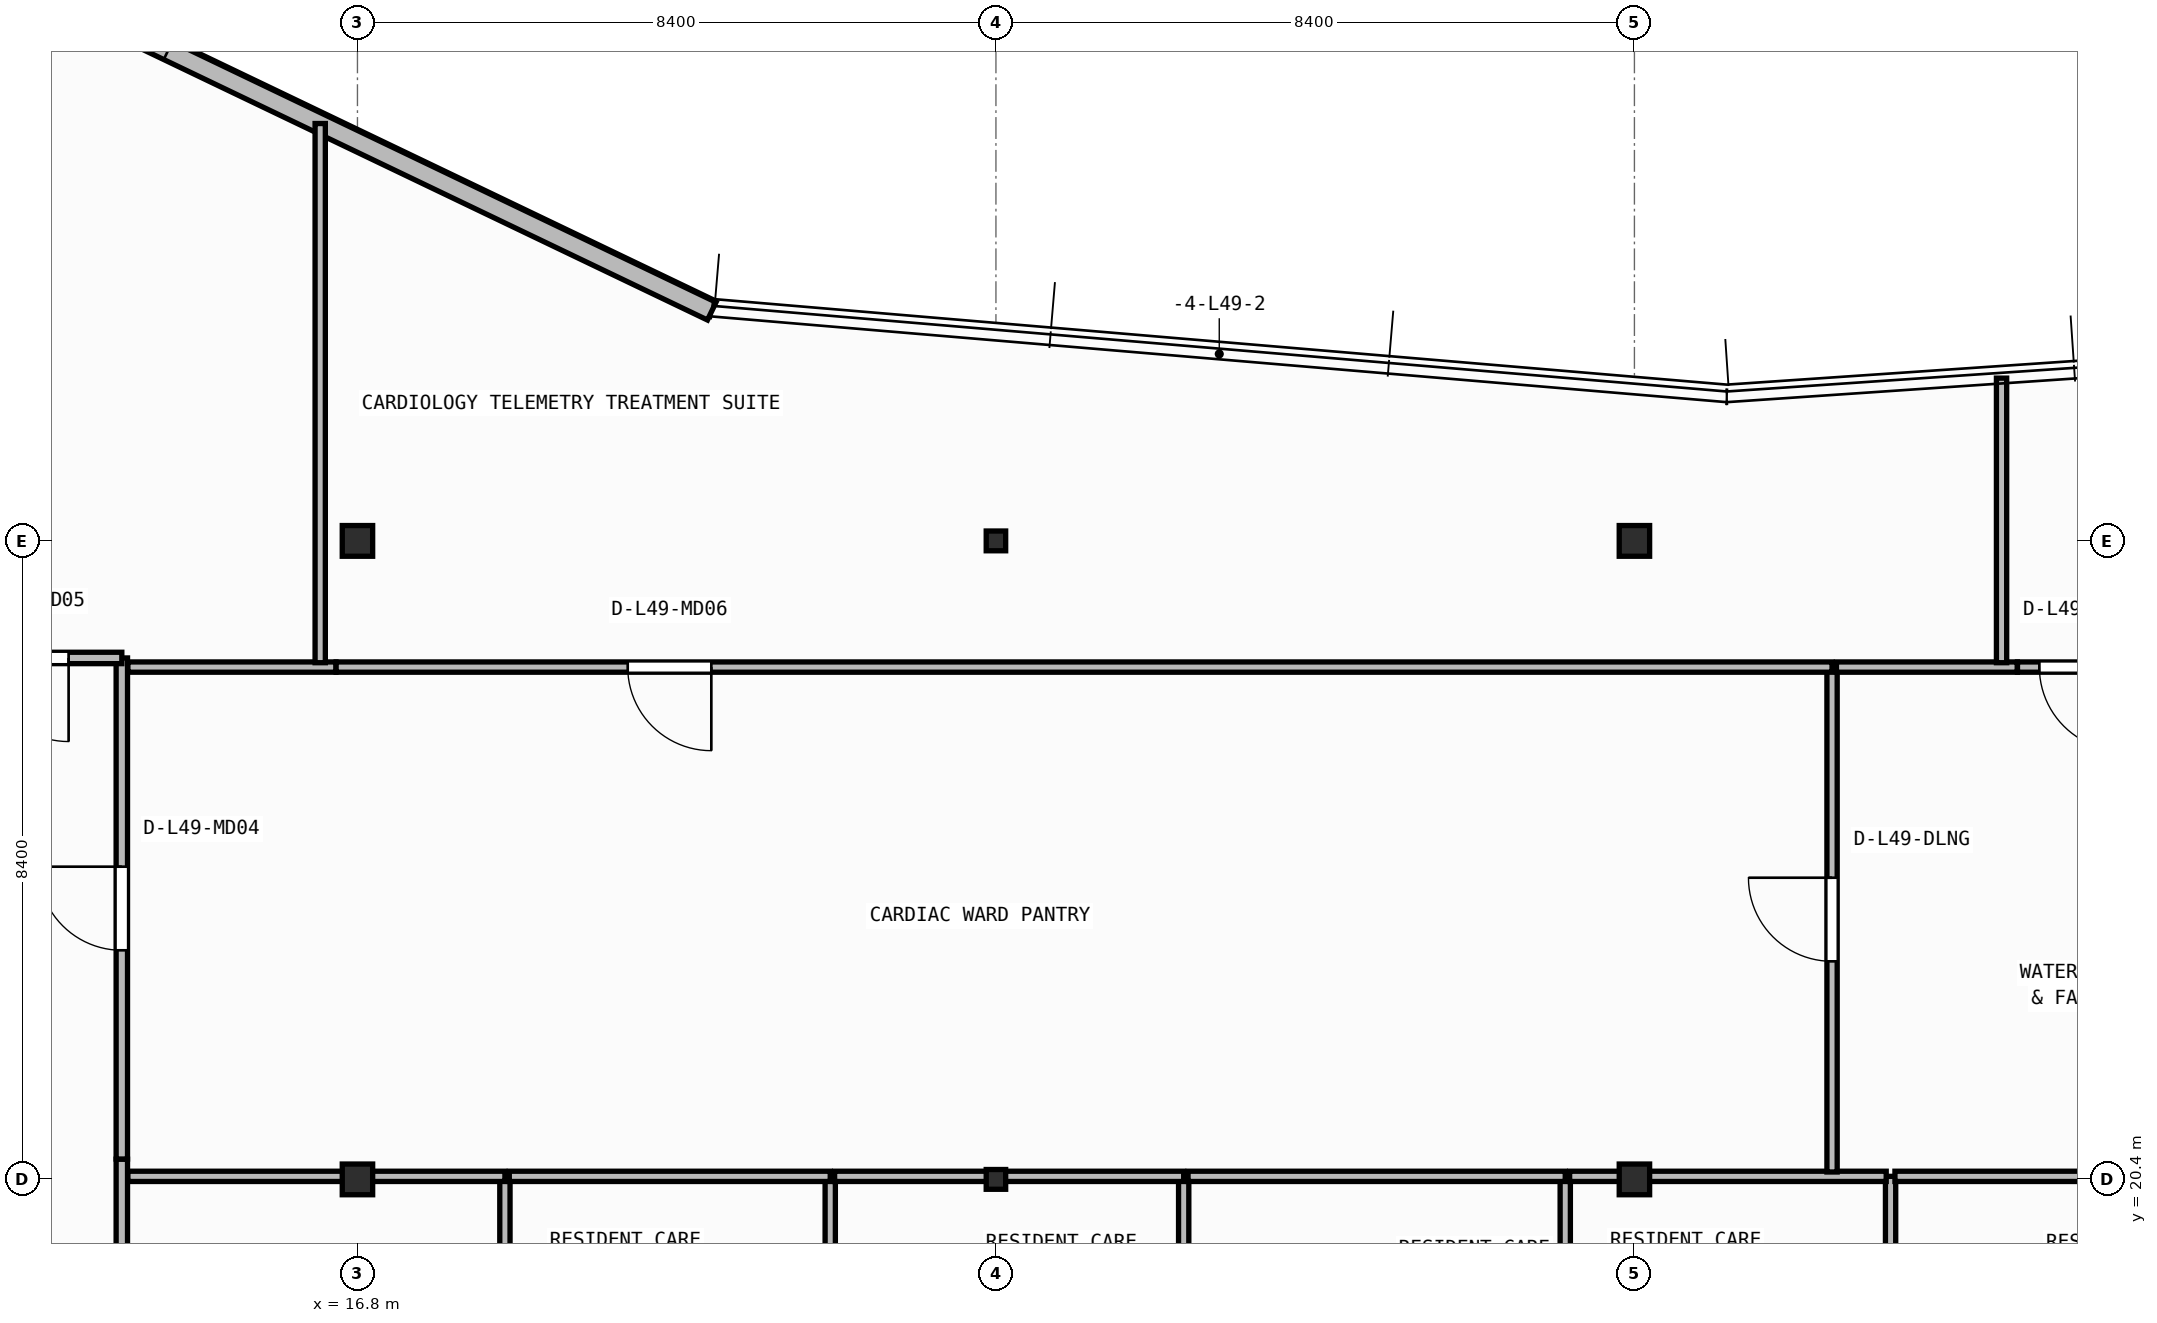
"""IFC4 building model, lengths in metres.
Left out: names, types, materials, properties, quantities, classifications, styles, units other than length and angle.
Written with IfcOpenShell. Run it as: python <this file> out.ifc"""

import sys

from ifc_helpers import new_model, si_unit, direction, frame, frame_2d, origin, origin_2d, place, context, subcontext, project, spatial, rectangle, i_section, extrude, element, fill, save


model = new_model("IFC4")
c1 = context("Model", 3, precision=1e-05, world=origin(), true_north=direction((0.0, 1.0)))
c2 = subcontext(c1, "Body", "Model", "MODEL_VIEW")
j1 = project(units=[si_unit("LENGTHUNIT", "METRE"), si_unit("PLANEANGLEUNIT", "RADIAN")], contexts=[c1])
p1 = place(None, origin())
s1 = spatial("IfcSite", under=j1, at=p1, CompositionType="ELEMENT")
p2 = place(p1, origin())
s2 = spatial("IfcBuilding", under=s1, at=p2, CompositionType="ELEMENT")
p3 = place(p2, frame((0.0, 0.0, 200.0)))
s3 = spatial("IfcBuildingStorey", under=s2, at=p3, CompositionType="ELEMENT", Elevation=200.0)
p4 = place(p3, frame((16.8, 20.4, 0.0), z_axis=(0.0, 0.0, 1.0), x_axis=(1.0, 0.0, 0.0)))
e1 = element("IfcColumn", 1, at=p4, inside=s3, PredefinedType="COLUMN", context=c2, shape_type="SweptSolid", body=[
    extrude(i_section(OverallWidth=0.4, OverallDepth=0.404, WebThickness=0.02, FlangeThickness=0.032, at=origin_2d()), origin(), (0.0, 0.0, 1.0), 3.95),
])
p5 = place(p3, frame((25.2, 20.4, 0.0), z_axis=(0.0, 0.0, 1.0), x_axis=(1.0, 0.0, 0.0)))
e2 = element("IfcColumn", 2, at=p5, inside=s3, PredefinedType="COLUMN", context=c2, shape_type="SweptSolid", body=[
    extrude(i_section(OverallWidth=0.256, OverallDepth=0.26, WebThickness=0.01, FlangeThickness=0.017, FilletRadius=0.013, at=origin_2d()), origin(), (0.0, 0.0, 1.0), 3.95),
])
for number, where, z_axis, x_axis in (
    (3, (33.6, 20.4, 0.0), (0.0, 0.0, 1.0), (1.0, 0.0, 0.0)),
    (4, (16.8, 28.8, 0.0), (0.0, 0.0, 1.0), (1.0, 0.0, 0.0)),
):
    element("IfcColumn", number, at=place(p3, frame(where, z_axis=z_axis, x_axis=x_axis)), inside=s3, PredefinedType="COLUMN", context=c2, shape_type="SweptSolid", body=[
        extrude(i_section(OverallWidth=0.4, OverallDepth=0.404, WebThickness=0.02, FlangeThickness=0.032, at=origin_2d()), origin(), (0.0, 0.0, 1.0), 3.95),
    ])
p6 = place(p3, frame((25.2, 28.8, 0.0), z_axis=(0.0, 0.0, 1.0), x_axis=(1.0, 0.0, 0.0)))
e5 = element("IfcColumn", 5, at=p6, inside=s3, PredefinedType="COLUMN", context=c2, shape_type="SweptSolid", body=[
    extrude(i_section(OverallWidth=0.256, OverallDepth=0.26, WebThickness=0.01, FlangeThickness=0.017, FilletRadius=0.013, at=origin_2d()), origin(), (0.0, 0.0, 1.0), 3.95),
])
p7 = place(p3, frame((33.6, 28.8, 0.0), z_axis=(0.0, 0.0, 1.0), x_axis=(1.0, 0.0, 0.0)))
e6 = element("IfcColumn", 6, at=p7, inside=s3, PredefinedType="COLUMN", context=c2, shape_type="SweptSolid", body=[
    extrude(i_section(OverallWidth=0.4, OverallDepth=0.404, WebThickness=0.02, FlangeThickness=0.032, at=origin_2d()), origin(), (0.0, 0.0, 1.0), 3.95),
])
p8 = place(p3, frame((21.461, 31.823, 0.0), z_axis=(0.0, 0.0, 1.0), x_axis=(-0.901858094827, 0.432032379336, 0.0)))
e7 = element("IfcWall", 7, at=p8, inside=s3, PredefinedType="STANDARD", context=c2, shape_type="SweptSolid", body=[
    extrude(rectangle(XDim=12.532, YDim=0.26, at=frame_2d((6.266, 0.0))), origin(), (0.0, 0.0, 1.0), 3.71),
])
p9 = place(p8, frame((7.932, 0.0, 0.9)))
e8 = element("IfcOpeningElement", 8, at=p9, cuts=e7, PredefinedType="OPENING", context=c2, shape_type="SweptSolid", body=[
    extrude(rectangle(XDim=2.4, YDim=1.65, at=frame_2d((1.2, 0.825))), frame((0.0, 0.14, 0.0), z_axis=(0.0, -1.0, 0.0), x_axis=(1.0, 0.0, 0.0)), (0.0, 0.0, 1.0), 0.28),
])
p10 = place(p3, frame((13.7, 17.814, 0.0), z_axis=(0.0, 0.0, 1.0), x_axis=(0.0, 1.0, 0.0)))
e9 = element("IfcWall", 9, at=p10, inside=s3, PredefinedType="PARTITIONING", context=c2, shape_type="SweptSolid", body=[
    extrude(rectangle(XDim=2.852, YDim=0.15, at=frame_2d((1.426, 0.0))), origin(), (0.0, 0.0, 1.0), 3.71),
])
p11 = place(p3, frame((13.7, 20.668, 0.0), z_axis=(0.0, 0.0, 1.0), x_axis=(0.0, 1.0, 0.0)))
e10 = element("IfcWall", 10, at=p11, inside=s3, PredefinedType="PARTITIONING", context=c2, shape_type="SweptSolid", body=[
    extrude(rectangle(XDim=6.592, YDim=0.15, at=frame_2d((3.296, 0.0))), origin(), (0.0, 0.0, 1.0), 3.71),
])
p12 = place(p11, frame((2.746, 0.0, 0.0)))
e11 = element("IfcOpeningElement", 11, at=p12, cuts=e10, PredefinedType="OPENING", context=c2, shape_type="SweptSolid", body=[
    extrude(rectangle(XDim=1.1, YDim=2.1, at=frame_2d((0.55, 1.05))), frame((0.0, 0.085, 0.0), z_axis=(0.0, -1.0, 0.0), x_axis=(1.0, 0.0, 0.0)), (0.0, 0.0, 1.0), 0.17),
])
p13 = place(p3, frame((13.7, 27.26, 0.0), z_axis=(0.0, 0.0, 1.0), x_axis=(-1.0, 0.0, 0.0)))
e12 = element("IfcWall", 12, at=p13, inside=s3, PredefinedType="PARTITIONING", context=c2, shape_type="SweptSolid", body=[
    extrude(rectangle(XDim=2.5, YDim=0.15, at=frame_2d((1.25, 0.0))), origin(), (0.0, 0.0, 1.0), 3.71),
])
p14 = place(p13, frame((0.7, 0.0, 0.0)))
e13 = element("IfcOpeningElement", 13, at=p14, cuts=e12, PredefinedType="OPENING", context=c2, shape_type="SweptSolid", body=[
    extrude(rectangle(XDim=1.1, YDim=2.1, at=frame_2d((0.55, 1.05))), frame((0.0, 0.085, 0.0), z_axis=(0.0, -1.0, 0.0), x_axis=(1.0, 0.0, 0.0)), (0.0, 0.0, 1.0), 0.17),
])
p15 = place(p3, frame((18.74, 17.833, 0.0), z_axis=(0.0, 0.0, 1.0), x_axis=(0.0, 1.0, 0.0)))
e14 = element("IfcWall", 14, at=p15, inside=s3, PredefinedType="PARTITIONING", context=c2, shape_type="SweptSolid", body=[
    extrude(rectangle(XDim=2.607, YDim=0.135, at=frame_2d((1.304, 0.0))), origin(), (0.0, 0.0, 1.0), 3.71),
])
p16 = place(p3, frame((18.74, 20.44, 0.0), z_axis=(0.0, 0.0, 1.0), x_axis=(-1.0, 0.0, 0.0)))
e15 = element("IfcWall", 15, at=p16, inside=s3, PredefinedType="PARTITIONING", context=c2, shape_type="SweptSolid", body=[
    extrude(rectangle(XDim=4.96, YDim=0.135, at=frame_2d((2.48, 0.0))), origin(), (0.0, 0.0, 1.0), 3.152),
])
p17 = place(p3, frame((23.02, 17.833, 0.0), z_axis=(0.0, 0.0, 1.0), x_axis=(0.0, 1.0, 0.0)))
e16 = element("IfcWall", 16, at=p17, inside=s3, PredefinedType="PARTITIONING", context=c2, shape_type="SweptSolid", body=[
    extrude(rectangle(XDim=2.607, YDim=0.135, at=frame_2d((1.304, 0.0))), origin(), (0.0, 0.0, 1.0), 3.71),
])
p18 = place(p3, frame((23.02, 20.44, 0.0), z_axis=(0.0, 0.0, 1.0), x_axis=(-1.0, 0.0, 0.0)))
e17 = element("IfcWall", 17, at=p18, inside=s3, PredefinedType="PARTITIONING", context=c2, shape_type="SweptSolid", body=[
    extrude(rectangle(XDim=4.222, YDim=0.135, at=frame_2d((2.111, 0.0))), origin(), (0.0, 0.0, 1.0), 3.152),
])
p19 = place(p3, frame((27.67, 17.833, 0.0), z_axis=(0.0, 0.0, 1.0), x_axis=(0.0, 1.0, 0.0)))
e18 = element("IfcWall", 18, at=p19, inside=s3, PredefinedType="PARTITIONING", context=c2, shape_type="SweptSolid", body=[
    extrude(rectangle(XDim=2.607, YDim=0.135, at=frame_2d((1.304, 0.0))), origin(), (0.0, 0.0, 1.0), 3.71),
])
p20 = place(p3, frame((27.67, 20.44, 0.0), z_axis=(0.0, 0.0, 1.0), x_axis=(-1.0, 0.0, 0.0)))
e19 = element("IfcWall", 19, at=p20, inside=s3, PredefinedType="PARTITIONING", context=c2, shape_type="SweptSolid", body=[
    extrude(rectangle(XDim=4.593, YDim=0.135, at=frame_2d((2.296, 0.0))), origin(), (0.0, 0.0, 1.0), 3.152),
])
p21 = place(p3, frame((32.69, 17.833, 0.0), z_axis=(0.0, 0.0, 1.0), x_axis=(0.0, 1.0, 0.0)))
e20 = element("IfcWall", 20, at=p21, inside=s3, PredefinedType="PARTITIONING", context=c2, shape_type="SweptSolid", body=[
    extrude(rectangle(XDim=2.607, YDim=0.135, at=frame_2d((1.304, 0.0))), origin(), (0.0, 0.0, 1.0), 3.71),
])
p22 = place(p3, frame((32.69, 20.44, 0.0), z_axis=(0.0, 0.0, 1.0), x_axis=(-1.0, 0.0, 0.0)))
e21 = element("IfcWall", 21, at=p22, inside=s3, PredefinedType="PARTITIONING", context=c2, shape_type="SweptSolid", body=[
    extrude(rectangle(XDim=4.962, YDim=0.135, at=frame_2d((2.481, 0.0))), origin(), (0.0, 0.0, 1.0), 3.152),
])
p23 = place(p3, frame((36.97, 17.833, 0.0), z_axis=(0.0, 0.0, 1.0), x_axis=(0.0, 1.0, 0.0)))
e22 = element("IfcWall", 22, at=p23, inside=s3, PredefinedType="PARTITIONING", context=c2, shape_type="SweptSolid", body=[
    extrude(rectangle(XDim=2.607, YDim=0.135, at=frame_2d((1.304, 0.0))), origin(), (0.0, 0.0, 1.0), 3.71),
])
p24 = place(p3, frame((36.913, 20.44, 0.0), z_axis=(0.0, 0.0, 1.0), x_axis=(-1.0, 0.0, 0.0)))
e23 = element("IfcWall", 23, at=p24, inside=s3, PredefinedType="PARTITIONING", context=c2, shape_type="SweptSolid", body=[
    extrude(rectangle(XDim=4.165, YDim=0.135, at=frame_2d((2.083, 0.0))), origin(), (0.0, 0.0, 1.0), 3.152),
])
p25 = place(p3, frame((41.62, 20.44, 0.0), z_axis=(0.0, 0.0, 1.0), x_axis=(-1.0, 0.0, 0.0)))
e24 = element("IfcWall", 24, at=p25, inside=s3, PredefinedType="PARTITIONING", context=c2, shape_type="SweptSolid", body=[
    extrude(rectangle(XDim=4.593, YDim=0.135, at=frame_2d((2.296, 0.0))), origin(), (0.0, 0.0, 1.0), 3.152),
])
p26 = place(p3, frame((36.2, 20.498, 0.0), z_axis=(0.0, 0.0, 1.0), x_axis=(0.0, 1.0, 0.0)))
e25 = element("IfcWall", 25, at=p26, inside=s3, PredefinedType="PARTITIONING", context=c2, shape_type="SweptSolid", body=[
    extrude(rectangle(XDim=6.642, YDim=0.135, at=frame_2d((3.321, 0.0))), origin(), (0.0, 0.0, 1.0), 3.71),
])
p27 = place(p26, frame((2.771, 0.0, 0.0)))
e26 = element("IfcOpeningElement", 26, at=p27, cuts=e25, PredefinedType="OPENING", context=c2, shape_type="SweptSolid", body=[
    extrude(rectangle(XDim=1.1, YDim=2.1, at=frame_2d((0.55, 1.05))), frame((0.0, 0.077, 0.0), z_axis=(0.0, -1.0, 0.0), x_axis=(1.0, 0.0, 0.0)), (0.0, 0.0, 1.0), 0.155),
])
p28 = place(p3, frame((16.518, 27.14, 0.0), z_axis=(0.0, 0.0, 1.0), x_axis=(-1.0, 0.0, 0.0)))
e27 = element("IfcWall", 27, at=p28, inside=s3, PredefinedType="PARTITIONING", context=c2, shape_type="SweptSolid", body=[
    extrude(rectangle(XDim=2.738, YDim=0.135, at=frame_2d((1.369, 0.0))), origin(), (0.0, 0.0, 1.0), 3.71),
])
p29 = place(p3, frame((36.2, 27.14, 0.0), z_axis=(0.0, 0.0, 1.0), x_axis=(-1.0, 0.0, 0.0)))
e28 = element("IfcWall", 28, at=p29, inside=s3, PredefinedType="PARTITIONING", context=c2, shape_type="SweptSolid", body=[
    extrude(rectangle(XDim=19.68, YDim=0.135, at=frame_2d((9.84, 0.0))), origin(), (0.0, 0.0, 1.0), 3.71),
])
p30 = place(p29, frame((14.744, 0.0, 0.0)))
e29 = element("IfcOpeningElement", 29, at=p30, cuts=e28, PredefinedType="OPENING", context=c2, shape_type="SweptSolid", body=[
    extrude(rectangle(XDim=1.1, YDim=2.1, at=frame_2d((0.55, 1.05))), frame((0.0, 0.077, 0.0), z_axis=(0.0, -1.0, 0.0), x_axis=(1.0, 0.0, 0.0)), (0.0, 0.0, 1.0), 0.155),
])
p31 = place(p3, frame((38.637, 27.14, 0.0), z_axis=(0.0, 0.0, 1.0), x_axis=(-1.0, 0.0, 0.0)))
e30 = element("IfcWall", 30, at=p31, inside=s3, PredefinedType="PARTITIONING", context=c2, shape_type="SweptSolid", body=[
    extrude(rectangle(XDim=2.38, YDim=0.135, at=frame_2d((1.19, 0.0))), origin(), (0.0, 0.0, 1.0), 3.71),
])
p32 = place(p3, frame((43.66, 27.14, 0.0), z_axis=(0.0, 0.0, 1.0), x_axis=(-1.0, 0.0, 0.0)))
e31 = element("IfcWall", 31, at=p32, inside=s3, PredefinedType="PARTITIONING", context=c2, shape_type="SweptSolid", body=[
    extrude(rectangle(XDim=5.021, YDim=0.135, at=frame_2d((2.51, 0.0))), origin(), (0.0, 0.0, 1.0), 3.71),
])
p33 = place(p32, frame((3.633, 0.0, 0.0)))
e32 = element("IfcOpeningElement", 32, at=p33, cuts=e31, PredefinedType="OPENING", context=c2, shape_type="SweptSolid", body=[
    extrude(rectangle(XDim=1.1, YDim=2.1, at=frame_2d((0.55, 1.05))), frame((0.0, 0.077, 0.0), z_axis=(0.0, -1.0, 0.0), x_axis=(1.0, 0.0, 0.0)), (0.0, 0.0, 1.0), 0.155),
])
p34 = place(p3, frame((16.31, 27.198, 0.0), z_axis=(0.0, 0.0, 1.0), x_axis=(0.0, 1.0, 0.0)))
e33 = element("IfcWall", 33, at=p34, inside=s3, PredefinedType="PARTITIONING", context=c2, shape_type="SweptSolid", body=[
    extrude(rectangle(XDim=7.093, YDim=0.135, at=frame_2d((3.547, 0.0))), origin(), (0.0, 0.0, 1.0), 3.157),
])
p35 = place(p3, frame((38.43, 27.198, 0.0), z_axis=(0.0, 0.0, 1.0), x_axis=(0.0, 1.0, 0.0)))
e34 = element("IfcWall", 34, at=p35, inside=s3, PredefinedType="PARTITIONING", context=c2, shape_type="SweptSolid", body=[
    extrude(rectangle(XDim=3.744, YDim=0.135, at=frame_2d((1.872, 0.0))), origin(), (0.0, 0.0, 1.0), 3.71),
])
p36 = place(p9, origin())
e35 = element("IfcWindow", 35, at=p36, inside=s3, PartitioningType="SINGLE_PANEL", PredefinedType="WINDOW", context=c2, shape_type="SweptSolid", body=[
    extrude(rectangle(XDim=2.4, YDim=1.65, at=frame_2d((1.2, 0.825))), frame((0.0, 0.03, 0.0), z_axis=(0.0, -1.0, 0.0), x_axis=(1.0, 0.0, 0.0)), (0.0, 0.0, 1.0), 0.06),
])
fill(e8, e35)
p37 = place(p12, origin())
e36 = element("IfcDoor", 36, at=p37, inside=s3, OperationType="SINGLE_SWING_RIGHT", PredefinedType="DOOR", context=c2, shape_type="SweptSolid", body=[
    extrude(rectangle(XDim=1.1, YDim=2.1, at=frame_2d((0.55, 1.05))), frame((0.0, 0.025, 0.0), z_axis=(0.0, -1.0, 0.0), x_axis=(1.0, 0.0, 0.0)), (0.0, 0.0, 1.0), 0.05),
])
fill(e11, e36)
p38 = place(p14, origin())
e37 = element("IfcDoor", 37, at=p38, inside=s3, OperationType="SINGLE_SWING_LEFT", PredefinedType="DOOR", context=c2, shape_type="SweptSolid", body=[
    extrude(rectangle(XDim=1.1, YDim=2.1, at=frame_2d((0.55, 1.05))), frame((0.0, 0.025, 0.0), z_axis=(0.0, -1.0, 0.0), x_axis=(1.0, 0.0, 0.0)), (0.0, 0.0, 1.0), 0.05),
])
fill(e13, e37)
p39 = place(p27, origin())
e38 = element("IfcDoor", 38, at=p39, inside=s3, OperationType="SINGLE_SWING_RIGHT", PredefinedType="DOOR", context=c2, shape_type="SweptSolid", body=[
    extrude(rectangle(XDim=1.1, YDim=2.1, at=frame_2d((0.55, 1.05))), frame((0.0, 0.025, 0.0), z_axis=(0.0, -1.0, 0.0), x_axis=(1.0, 0.0, 0.0)), (0.0, 0.0, 1.0), 0.05),
])
fill(e26, e38)
p40 = place(p30, origin())
e39 = element("IfcDoor", 39, at=p40, inside=s3, OperationType="SINGLE_SWING_LEFT", PredefinedType="DOOR", context=c2, shape_type="SweptSolid", body=[
    extrude(rectangle(XDim=1.1, YDim=2.1, at=frame_2d((0.55, 1.05))), frame((0.0, 0.025, 0.0), z_axis=(0.0, -1.0, 0.0), x_axis=(1.0, 0.0, 0.0)), (0.0, 0.0, 1.0), 0.05),
])
fill(e29, e39)
p41 = place(p33, origin())
e40 = element("IfcDoor", 40, at=p41, inside=s3, OperationType="SINGLE_SWING_LEFT", PredefinedType="DOOR", context=c2, shape_type="SweptSolid", body=[
    extrude(rectangle(XDim=1.1, YDim=2.1, at=frame_2d((0.55, 1.05))), frame((0.0, 0.025, 0.0), z_axis=(0.0, -1.0, 0.0), x_axis=(1.0, 0.0, 0.0)), (0.0, 0.0, 1.0), 0.05),
])
fill(e32, e40)
save(model, sys.argv[1])
